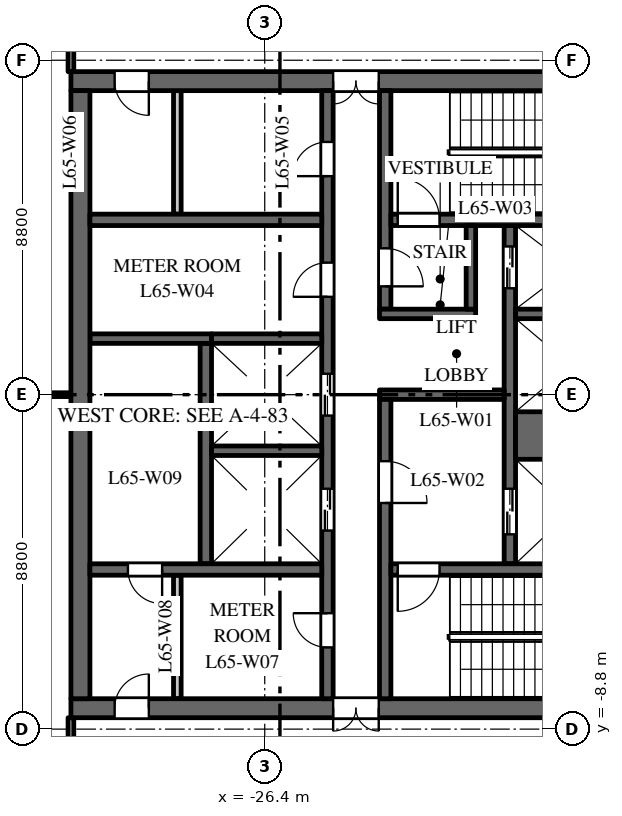
"""IFC4 building model, lengths in metres.
Left out: names, types, materials, properties, quantities, classifications, styles, units other than length and angle.
Written with IfcOpenShell. Run it as: python <this file> out.ifc"""

import sys

from ifc_helpers import new_model, si_unit, direction, frame, frame_2d, origin, place, context, subcontext, project, spatial, rectangle, extrude, element, fill, save


model = new_model("IFC4")
c1 = context("Model", 3, precision=1e-05, world=origin(), true_north=direction((0.0, 1.0)))
c2 = subcontext(c1, "Body", "Model", "MODEL_VIEW")
j1 = project(units=[si_unit("LENGTHUNIT", "METRE"), si_unit("PLANEANGLEUNIT", "RADIAN")], contexts=[c1])
p1 = place(None, origin())
s1 = spatial("IfcSite", under=j1, at=p1, CompositionType="ELEMENT")
p2 = place(p1, origin())
s2 = spatial("IfcBuilding", under=s1, at=p2, CompositionType="ELEMENT")
p3 = place(p2, frame((0.0, 0.0, 303.0)))
s3 = spatial("IfcBuildingStorey", under=s2, at=p3, CompositionType="ELEMENT", Elevation=303.0)
p4 = place(p3, frame((-16.5, 8.25, 0.0), z_axis=(0.0, 0.0, 1.0), x_axis=(-1.0, 0.0, 0.0)))
e1 = element("IfcWall", 1, at=p4, inside=s3, PredefinedType="SHEAR", context=c2, shape_type="SweptSolid", body=[
    extrude(rectangle(XDim=15.0, YDim=0.5, at=frame_2d((7.5, 0.0))), origin(), (0.0, 0.0, 1.0), 3.7),
])
p5 = place(p4, frame((6.9, 0.0, 0.0)))
e2 = element("IfcOpeningElement", 2, at=p5, cuts=e1, PredefinedType="OPENING", context=c2, shape_type="SweptSolid", body=[
    extrude(rectangle(XDim=1.2, YDim=2.1, at=frame_2d((0.6, 1.05))), frame((0.0, 0.26, 0.0), z_axis=(0.0, -1.0, 0.0), x_axis=(1.0, 0.0, 0.0)), (0.0, 0.0, 1.0), 0.52),
])
p6 = place(p4, frame((12.95, 0.0, 0.0)))
e3 = element("IfcOpeningElement", 3, at=p6, cuts=e1, PredefinedType="OPENING", context=c2, shape_type="SweptSolid", body=[
    extrude(rectangle(XDim=0.9, YDim=2.1, at=frame_2d((0.45, 1.05))), frame((0.0, 0.26, 0.0), z_axis=(0.0, -1.0, 0.0), x_axis=(1.0, 0.0, 0.0)), (0.0, 0.0, 1.0), 0.52),
])
p7 = place(p3, frame((-16.5, -8.25, 0.0), z_axis=(0.0, 0.0, 1.0), x_axis=(-1.0, 0.0, 0.0)))
e4 = element("IfcWall", 4, at=p7, inside=s3, PredefinedType="SHEAR", context=c2, shape_type="SweptSolid", body=[
    extrude(rectangle(XDim=15.0, YDim=0.5, at=frame_2d((7.5, 0.0))), origin(), (0.0, 0.0, 1.0), 3.7),
])
p8 = place(p7, frame((6.9, 0.0, 0.0)))
e5 = element("IfcOpeningElement", 5, at=p8, cuts=e4, PredefinedType="OPENING", context=c2, shape_type="SweptSolid", body=[
    extrude(rectangle(XDim=1.2, YDim=2.1, at=frame_2d((0.6, 1.05))), frame((0.0, 0.26, 0.0), z_axis=(0.0, -1.0, 0.0), x_axis=(1.0, 0.0, 0.0)), (0.0, 0.0, 1.0), 0.52),
])
p9 = place(p7, frame((12.95, 0.0, 0.0)))
e6 = element("IfcOpeningElement", 6, at=p9, cuts=e4, PredefinedType="OPENING", context=c2, shape_type="SweptSolid", body=[
    extrude(rectangle(XDim=0.9, YDim=2.1, at=frame_2d((0.45, 1.05))), frame((0.0, 0.26, 0.0), z_axis=(0.0, -1.0, 0.0), x_axis=(1.0, 0.0, 0.0)), (0.0, 0.0, 1.0), 0.52),
])
p10 = place(p3, frame((-27.95, -4.45, 0.0), z_axis=(0.0, 0.0, 1.0), x_axis=(0.0, 1.0, 0.0)))
e7 = element("IfcWall", 7, at=p10, inside=s3, PredefinedType="SHEAR", context=c2, shape_type="SweptSolid", body=[
    extrude(rectangle(XDim=5.8, YDim=0.3, at=frame_2d((2.9, 0.0))), origin(), (0.0, 0.0, 1.0), 3.7),
])
p11 = place(p3, frame((-27.8, 1.475, 0.0), z_axis=(0.0, 0.0, 1.0), x_axis=(-1.0, 0.0, 0.0)))
e8 = element("IfcWall", 8, at=p11, inside=s3, PredefinedType="SHEAR", context=c2, shape_type="SweptSolid", body=[
    extrude(rectangle(XDim=3.2, YDim=0.25, at=frame_2d((1.6, 0.0))), origin(), (0.0, 0.0, 1.0), 3.7),
])
p12 = place(p3, frame((-19.95, -4.45, 0.0), z_axis=(0.0, 0.0, 1.0), x_axis=(0.0, 1.0, 0.0)))
e9 = element("IfcWall", 9, at=p12, inside=s3, PredefinedType="SHEAR", context=c2, shape_type="SweptSolid", body=[
    extrude(rectangle(XDim=8.9, YDim=0.3, at=frame_2d((4.45, 0.0))), origin(), (0.0, 0.0, 1.0), 3.7),
])
p13 = place(p12, frame((0.775, 0.0, 0.0)))
e10 = element("IfcOpeningElement", 10, at=p13, cuts=e9, PredefinedType="OPENING", context=c2, shape_type="SweptSolid", body=[
    extrude(rectangle(XDim=1.2, YDim=2.1, at=frame_2d((0.6, 1.05))), frame((0.0, 0.16, 0.0), z_axis=(0.0, -1.0, 0.0), x_axis=(1.0, 0.0, 0.0)), (0.0, 0.0, 1.0), 0.32),
])
p14 = place(p12, frame((7.25, 0.0, 0.0)))
e11 = element("IfcOpeningElement", 11, at=p14, cuts=e9, PredefinedType="OPENING", context=c2, shape_type="SweptSolid", body=[
    extrude(rectangle(XDim=1.1, YDim=2.1, at=frame_2d((0.55, 1.05))), frame((0.0, 0.16, 0.0), z_axis=(0.0, -1.0, 0.0), x_axis=(1.0, 0.0, 0.0)), (0.0, 0.0, 1.0), 0.32),
])
p15 = place(p3, frame((-24.75, -8.0, 0.0), z_axis=(0.0, 0.0, 1.0), x_axis=(0.0, 1.0, 0.0)))
e12 = element("IfcWall", 12, at=p15, inside=s3, PredefinedType="SHEAR", context=c2, shape_type="SweptSolid", body=[
    extrude(rectangle(XDim=16.0, YDim=0.3, at=frame_2d((8.0, 0.0))), origin(), (0.0, 0.0, 1.0), 3.7),
])
p16 = place(p15, frame((4.425, 0.0, 0.0)))
e13 = element("IfcOpeningElement", 13, at=p16, cuts=e12, PredefinedType="OPENING", context=c2, shape_type="SweptSolid", body=[
    extrude(rectangle(XDim=1.1, YDim=2.1, at=frame_2d((0.55, 1.05))), frame((0.0, 0.16, 0.0), z_axis=(0.0, -1.0, 0.0), x_axis=(1.0, 0.0, 0.0)), (0.0, 0.0, 1.0), 0.32),
])
p17 = place(p15, frame((7.45, 0.0, 0.0)))
e14 = element("IfcOpeningElement", 14, at=p17, cuts=e12, PredefinedType="OPENING", context=c2, shape_type="SweptSolid", body=[
    extrude(rectangle(XDim=1.1, YDim=2.1, at=frame_2d((0.55, 1.05))), frame((0.0, 0.16, 0.0), z_axis=(0.0, -1.0, 0.0), x_axis=(1.0, 0.0, 0.0)), (0.0, 0.0, 1.0), 0.32),
])
p18 = place(p15, frame((10.575, 0.0, 0.0)))
e15 = element("IfcOpeningElement", 15, at=p18, cuts=e12, PredefinedType="OPENING", context=c2, shape_type="SweptSolid", body=[
    extrude(rectangle(XDim=0.9, YDim=2.1, at=frame_2d((0.45, 1.05))), frame((0.0, 0.16, 0.0), z_axis=(0.0, -1.0, 0.0), x_axis=(1.0, 0.0, 0.0)), (0.0, 0.0, 1.0), 0.32),
])
p19 = place(p15, frame((13.75, 0.0, 0.0)))
e16 = element("IfcOpeningElement", 16, at=p19, cuts=e12, PredefinedType="OPENING", context=c2, shape_type="SweptSolid", body=[
    extrude(rectangle(XDim=0.9, YDim=2.1, at=frame_2d((0.45, 1.05))), frame((0.0, 0.16, 0.0), z_axis=(0.0, -1.0, 0.0), x_axis=(1.0, 0.0, 0.0)), (0.0, 0.0, 1.0), 0.32),
])
p20 = place(p15, frame((1.35, 0.0, 0.0)))
e17 = element("IfcOpeningElement", 17, at=p20, cuts=e12, PredefinedType="OPENING", context=c2, shape_type="SweptSolid", body=[
    extrude(rectangle(XDim=0.9, YDim=2.1, at=frame_2d((0.45, 1.05))), frame((0.0, 0.16, 0.0), z_axis=(0.0, -1.0, 0.0), x_axis=(1.0, 0.0, 0.0)), (0.0, 0.0, 1.0), 0.32),
])
p21 = place(p3, frame((-20.1, 0.0, 0.0), z_axis=(0.0, 0.0, 1.0), x_axis=(-1.0, 0.0, 0.0)))
e18 = element("IfcWall", 18, at=p21, inside=s3, PredefinedType="SHEAR", context=c2, shape_type="SweptSolid", body=[
    extrude(rectangle(XDim=3.28, YDim=0.25, at=frame_2d((1.64, 0.0))), origin(), (0.0, 0.0, 1.0), 3.7),
])
p22 = place(p3, frame((-31.25, -8.0, 0.0), z_axis=(0.0, 0.0, 1.0), x_axis=(0.0, 1.0, 0.0)))
e19 = element("IfcWall", 19, at=p22, inside=s3, PredefinedType="SHEAR", context=c2, shape_type="SweptSolid", body=[
    extrude(rectangle(XDim=16.0, YDim=0.5, at=frame_2d((8.0, 0.0))), origin(), (0.0, 0.0, 1.0), 3.7),
])
p23 = place(p3, frame((-24.9, 4.6, 0.0), z_axis=(0.0, 0.0, 1.0), x_axis=(-1.0, 0.0, 0.0)))
e20 = element("IfcWall", 20, at=p23, inside=s3, PredefinedType="SHEAR", context=c2, shape_type="SweptSolid", body=[
    extrude(rectangle(XDim=6.1, YDim=0.3, at=frame_2d((3.05, 0.0))), origin(), (0.0, 0.0, 1.0), 3.7),
])
for number, where, z_axis, x_axis in (
    (21, (-28.7, 4.75, 0.0), (0.0, 0.0, 1.0), (0.0, 1.0, 0.0)),
    (22, (-28.7, -8.0, 0.0), (0.0, 0.0, 1.0), (0.0, 1.0, 0.0)),
):
    element("IfcWall", number, at=place(p3, frame(where, z_axis=z_axis, x_axis=x_axis)), inside=s3, PredefinedType="PARTITIONING", context=c2, shape_type="SweptSolid", body=[
        extrude(rectangle(XDim=3.25, YDim=0.2, at=frame_2d((1.625, 0.0))), origin(), (0.0, 0.0, 1.0), 3.7),
    ])
p24 = place(p3, frame((-24.9, -4.6, 0.0), z_axis=(0.0, 0.0, 1.0), x_axis=(-1.0, 0.0, 0.0)))
e23 = element("IfcWall", 23, at=p24, inside=s3, PredefinedType="SHEAR", context=c2, shape_type="SweptSolid", body=[
    extrude(rectangle(XDim=6.1, YDim=0.3, at=frame_2d((3.05, 0.0))), origin(), (0.0, 0.0, 1.0), 3.7),
])
p25 = place(p24, frame((4.2, 0.0, 0.0)))
e24 = element("IfcOpeningElement", 24, at=p25, cuts=e23, PredefinedType="OPENING", context=c2, shape_type="SweptSolid", body=[
    extrude(rectangle(XDim=0.9, YDim=2.1, at=frame_2d((0.45, 1.05))), frame((0.0, 0.16, 0.0), z_axis=(0.0, -1.0, 0.0), x_axis=(1.0, 0.0, 0.0)), (0.0, 0.0, 1.0), 0.32),
])
p26 = place(p3, frame((-16.9, -1.075, 0.0), z_axis=(0.0, 0.0, 1.0), x_axis=(-1.0, 0.0, 0.0)))
e25 = element("IfcWall", 25, at=p26, inside=s3, PredefinedType="SHEAR", context=c2, shape_type="SweptSolid", body=[
    extrude(rectangle(XDim=2.9, YDim=1.25, at=frame_2d((1.45, 0.0))), origin(), (0.0, 0.0, 1.0), 3.7),
])
for number, where, z_axis, x_axis in (
    (26, (-16.9, 2.125, 0.0), (0.0, 0.0, 1.0), (-1.0, 0.0, 0.0)),
    (27, (-24.9, -1.475, 0.0), (0.0, 0.0, 1.0), (-1.0, 0.0, 0.0)),
    (28, (-24.9, 1.475, 0.0), (0.0, 0.0, 1.0), (-1.0, 0.0, 0.0)),
):
    element("IfcWall", number, at=place(p3, frame(where, z_axis=z_axis, x_axis=x_axis)), inside=s3, PredefinedType="SHEAR", context=c2, shape_type="SweptSolid", body=[
        extrude(rectangle(XDim=2.9, YDim=0.25, at=frame_2d((1.45, 0.0))), origin(), (0.0, 0.0, 1.0), 3.7),
    ])
p27 = place(p3, frame((-23.23, 2.25, 0.0), z_axis=(0.0, 0.0, 1.0), x_axis=(0.0, 1.0, 0.0)))
e29 = element("IfcWall", 29, at=p27, inside=s3, PredefinedType="SHEAR", context=c2, shape_type="SweptSolid", body=[
    extrude(rectangle(XDim=5.75, YDim=0.3, at=frame_2d((2.875, 0.0))), origin(), (0.0, 0.0, 1.0), 3.7),
])
p28 = place(p27, frame((0.6, 0.0, 0.0)))
e30 = element("IfcOpeningElement", 30, at=p28, cuts=e29, PredefinedType="OPENING", context=c2, shape_type="SweptSolid", body=[
    extrude(rectangle(XDim=1.0, YDim=2.1, at=frame_2d((0.5, 1.05))), frame((0.0, 0.16, 0.0), z_axis=(0.0, -1.0, 0.0), x_axis=(1.0, 0.0, 0.0)), (0.0, 0.0, 1.0), 0.32),
])
p29 = place(p3, frame((-23.23, -8.0, 0.0), z_axis=(0.0, 0.0, 1.0), x_axis=(0.0, 1.0, 0.0)))
e31 = element("IfcWall", 31, at=p29, inside=s3, PredefinedType="SHEAR", context=c2, shape_type="SweptSolid", body=[
    extrude(rectangle(XDim=7.875, YDim=0.3, at=frame_2d((3.938, 0.0))), origin(), (0.0, 0.0, 1.0), 3.7),
])
p30 = place(p29, frame((5.15, 0.0, 0.0)))
e32 = element("IfcOpeningElement", 32, at=p30, cuts=e31, PredefinedType="OPENING", context=c2, shape_type="SweptSolid", body=[
    extrude(rectangle(XDim=1.1, YDim=2.1, at=frame_2d((0.55, 1.05))), frame((0.0, 0.16, 0.0), z_axis=(0.0, -1.0, 0.0), x_axis=(1.0, 0.0, 0.0)), (0.0, 0.0, 1.0), 0.32),
])
p31 = place(p3, frame((-16.9, 4.6, 0.0), z_axis=(0.0, 0.0, 1.0), x_axis=(-1.0, 0.0, 0.0)))
e33 = element("IfcWall", 33, at=p31, inside=s3, PredefinedType="SHEAR", context=c2, shape_type="SweptSolid", body=[
    extrude(rectangle(XDim=6.18, YDim=0.3, at=frame_2d((3.09, 0.0))), origin(), (0.0, 0.0, 1.0), 3.7),
])
p32 = place(p31, frame((4.9, 0.0, 0.0)))
e34 = element("IfcOpeningElement", 34, at=p32, cuts=e33, PredefinedType="OPENING", context=c2, shape_type="SweptSolid", body=[
    extrude(rectangle(XDim=1.1, YDim=2.1, at=frame_2d((0.55, 1.05))), frame((0.0, 0.16, 0.0), z_axis=(0.0, -1.0, 0.0), x_axis=(1.0, 0.0, 0.0)), (0.0, 0.0, 1.0), 0.32),
])
p33 = place(p3, frame((-16.9, -4.6, 0.0), z_axis=(0.0, 0.0, 1.0), x_axis=(-1.0, 0.0, 0.0)))
e35 = element("IfcWall", 35, at=p33, inside=s3, PredefinedType="SHEAR", context=c2, shape_type="SweptSolid", body=[
    extrude(rectangle(XDim=6.18, YDim=0.3, at=frame_2d((3.09, 0.0))), origin(), (0.0, 0.0, 1.0), 3.7),
])
p34 = place(p33, frame((4.9, 0.0, 0.0)))
e36 = element("IfcOpeningElement", 36, at=p34, cuts=e35, PredefinedType="OPENING", context=c2, shape_type="SweptSolid", body=[
    extrude(rectangle(XDim=1.1, YDim=2.1, at=frame_2d((0.55, 1.05))), frame((0.0, 0.16, 0.0), z_axis=(0.0, -1.0, 0.0), x_axis=(1.0, 0.0, 0.0)), (0.0, 0.0, 1.0), 0.32),
])
p35 = place(p3, frame((-20.85, 2.125, 0.0), z_axis=(0.0, 0.0, 1.0), x_axis=(-1.0, 0.0, 0.0)))
e37 = element("IfcWall", 37, at=p35, inside=s3, PredefinedType="SHEAR", context=c2, shape_type="SweptSolid", body=[
    extrude(rectangle(XDim=2.53, YDim=0.25, at=frame_2d((1.265, 0.0))), origin(), (0.0, 0.0, 1.0), 3.7),
])
p36 = place(p3, frame((-20.975, 2.25, 0.0), z_axis=(0.0, 0.0, 1.0), x_axis=(0.0, 1.0, 0.0)))
e38 = element("IfcWall", 38, at=p36, inside=s3, PredefinedType="SHEAR", context=c2, shape_type="SweptSolid", body=[
    extrude(rectangle(XDim=2.2, YDim=0.25, at=frame_2d((1.1, 0.0))), origin(), (0.0, 0.0, 1.0), 3.7),
])
p37 = place(p3, frame((-35.949, 0.0, 0.0), z_axis=(0.0, 0.0, 1.0), x_axis=(1.0, 0.0, 0.0)))
e39 = element("IfcWall", 39, at=p37, inside=s3, PredefinedType="PARTITIONING", context=c2, shape_type="SweptSolid", body=[
    extrude(rectangle(XDim=4.449, YDim=0.1, at=frame_2d((2.225, 0.0))), origin(), (0.0, 0.0, 1.0), 3.0),
])
for number, where, z_axis, x_axis in (
    (40, (-31.5, -11.5, 0.0), (0.0, 0.0, 1.0), (0.0, 1.0, 0.0)),
    (41, (-31.5, 8.5, 0.0), (0.0, 0.0, 1.0), (0.0, 1.0, 0.0)),
):
    element("IfcWall", number, at=place(p3, frame(where, z_axis=z_axis, x_axis=x_axis)), inside=s3, PredefinedType="PARTITIONING", context=c2, shape_type="SweptSolid", body=[
        extrude(rectangle(XDim=3.0, YDim=0.15, at=frame_2d((1.5, 0.0))), origin(), (0.0, 0.0, 1.0), 3.0),
    ])
p38 = place(p13, origin())
e42 = element("IfcDoor", 42, at=p38, inside=s3, OperationType="DOUBLE_DOOR_SLIDING", PredefinedType="DOOR", context=c2, shape_type="SweptSolid", body=[
    extrude(rectangle(XDim=1.2, YDim=2.1, at=frame_2d((0.6, 1.05))), frame((0.0, 0.025, 0.0), z_axis=(0.0, -1.0, 0.0), x_axis=(1.0, 0.0, 0.0)), (0.0, 0.0, 1.0), 0.05),
])
fill(e10, e42)
p39 = place(p14, origin())
e43 = element("IfcDoor", 43, at=p39, inside=s3, OperationType="DOUBLE_DOOR_SLIDING", PredefinedType="DOOR", context=c2, shape_type="SweptSolid", body=[
    extrude(rectangle(XDim=1.1, YDim=2.1, at=frame_2d((0.55, 1.05))), frame((0.0, 0.025, 0.0), z_axis=(0.0, -1.0, 0.0), x_axis=(1.0, 0.0, 0.0)), (0.0, 0.0, 1.0), 0.05),
])
fill(e11, e43)
p40 = place(p16, origin())
e44 = element("IfcDoor", 44, at=p40, inside=s3, OperationType="DOUBLE_DOOR_SLIDING", PredefinedType="DOOR", context=c2, shape_type="SweptSolid", body=[
    extrude(rectangle(XDim=1.1, YDim=2.1, at=frame_2d((0.55, 1.05))), frame((0.0, 0.025, 0.0), z_axis=(0.0, -1.0, 0.0), x_axis=(1.0, 0.0, 0.0)), (0.0, 0.0, 1.0), 0.05),
])
fill(e13, e44)
p41 = place(p17, origin())
e45 = element("IfcDoor", 45, at=p41, inside=s3, OperationType="DOUBLE_DOOR_SLIDING", PredefinedType="DOOR", context=c2, shape_type="SweptSolid", body=[
    extrude(rectangle(XDim=1.1, YDim=2.1, at=frame_2d((0.55, 1.05))), frame((0.0, 0.025, 0.0), z_axis=(0.0, -1.0, 0.0), x_axis=(1.0, 0.0, 0.0)), (0.0, 0.0, 1.0), 0.05),
])
fill(e14, e45)
p42 = place(p32, origin())
e46 = element("IfcDoor", 46, at=p42, inside=s3, OperationType="SINGLE_SWING_RIGHT", PredefinedType="DOOR", context=c2, shape_type="SweptSolid", body=[
    extrude(rectangle(XDim=1.1, YDim=2.1, at=frame_2d((0.55, 1.05))), frame((0.0, 0.025, 0.0), z_axis=(0.0, -1.0, 0.0), x_axis=(1.0, 0.0, 0.0)), (0.0, 0.0, 1.0), 0.05),
])
fill(e34, e46)
p43 = place(p34, origin())
e47 = element("IfcDoor", 47, at=p43, inside=s3, OperationType="SINGLE_SWING_LEFT", PredefinedType="DOOR", context=c2, shape_type="SweptSolid", body=[
    extrude(rectangle(XDim=1.1, YDim=2.1, at=frame_2d((0.55, 1.05))), frame((0.0, 0.025, 0.0), z_axis=(0.0, -1.0, 0.0), x_axis=(1.0, 0.0, 0.0)), (0.0, 0.0, 1.0), 0.05),
])
fill(e36, e47)
p44 = place(p30, origin())
e48 = element("IfcDoor", 48, at=p44, inside=s3, OperationType="SINGLE_SWING_LEFT", PredefinedType="DOOR", context=c2, shape_type="SweptSolid", body=[
    extrude(rectangle(XDim=1.1, YDim=2.1, at=frame_2d((0.55, 1.05))), frame((0.0, 0.025, 0.0), z_axis=(0.0, -1.0, 0.0), x_axis=(1.0, 0.0, 0.0)), (0.0, 0.0, 1.0), 0.05),
])
fill(e32, e48)
p45 = place(p28, origin())
e49 = element("IfcDoor", 49, at=p45, inside=s3, OperationType="SINGLE_SWING_LEFT", PredefinedType="DOOR", context=c2, shape_type="SweptSolid", body=[
    extrude(rectangle(XDim=1.0, YDim=2.1, at=frame_2d((0.5, 1.05))), frame((0.0, 0.025, 0.0), z_axis=(0.0, -1.0, 0.0), x_axis=(1.0, 0.0, 0.0)), (0.0, 0.0, 1.0), 0.05),
])
fill(e30, e49)
p46 = place(p5, origin())
e50 = element("IfcDoor", 50, at=p46, inside=s3, OperationType="DOUBLE_DOOR_DOUBLE_SWING", PredefinedType="DOOR", context=c2, shape_type="SweptSolid", body=[
    extrude(rectangle(XDim=1.2, YDim=2.1, at=frame_2d((0.6, 1.05))), frame((0.0, 0.025, 0.0), z_axis=(0.0, -1.0, 0.0), x_axis=(1.0, 0.0, 0.0)), (0.0, 0.0, 1.0), 0.05),
])
fill(e2, e50)
p47 = place(p8, origin())
e51 = element("IfcDoor", 51, at=p47, inside=s3, OperationType="DOUBLE_DOOR_DOUBLE_SWING", PredefinedType="DOOR", context=c2, shape_type="SweptSolid", body=[
    extrude(rectangle(XDim=1.2, YDim=2.1, at=frame_2d((0.6, 1.05))), frame((0.0, 0.025, 0.0), z_axis=(0.0, -1.0, 0.0), x_axis=(1.0, 0.0, 0.0)), (0.0, 0.0, 1.0), 0.05),
])
fill(e5, e51)
p48 = place(p18, origin())
e52 = element("IfcDoor", 52, at=p48, inside=s3, OperationType="SINGLE_SWING_RIGHT", PredefinedType="DOOR", context=c2, shape_type="SweptSolid", body=[
    extrude(rectangle(XDim=0.9, YDim=2.1, at=frame_2d((0.45, 1.05))), frame((0.0, 0.025, 0.0), z_axis=(0.0, -1.0, 0.0), x_axis=(1.0, 0.0, 0.0)), (0.0, 0.0, 1.0), 0.05),
])
fill(e15, e52)
p49 = place(p19, origin())
e53 = element("IfcDoor", 53, at=p49, inside=s3, OperationType="SINGLE_SWING_RIGHT", PredefinedType="DOOR", context=c2, shape_type="SweptSolid", body=[
    extrude(rectangle(XDim=0.9, YDim=2.1, at=frame_2d((0.45, 1.05))), frame((0.0, 0.025, 0.0), z_axis=(0.0, -1.0, 0.0), x_axis=(1.0, 0.0, 0.0)), (0.0, 0.0, 1.0), 0.05),
])
fill(e16, e53)
p50 = place(p6, origin())
e54 = element("IfcDoor", 54, at=p50, inside=s3, OperationType="SINGLE_SWING_RIGHT", PredefinedType="DOOR", context=c2, shape_type="SweptSolid", body=[
    extrude(rectangle(XDim=0.9, YDim=2.1, at=frame_2d((0.45, 1.05))), frame((0.0, 0.025, 0.0), z_axis=(0.0, -1.0, 0.0), x_axis=(1.0, 0.0, 0.0)), (0.0, 0.0, 1.0), 0.05),
])
fill(e3, e54)
p51 = place(p20, origin())
e55 = element("IfcDoor", 55, at=p51, inside=s3, OperationType="SINGLE_SWING_LEFT", PredefinedType="DOOR", context=c2, shape_type="SweptSolid", body=[
    extrude(rectangle(XDim=0.9, YDim=2.1, at=frame_2d((0.45, 1.05))), frame((0.0, 0.025, 0.0), z_axis=(0.0, -1.0, 0.0), x_axis=(1.0, 0.0, 0.0)), (0.0, 0.0, 1.0), 0.05),
])
fill(e17, e55)
p52 = place(p9, origin())
e56 = element("IfcDoor", 56, at=p52, inside=s3, OperationType="SINGLE_SWING_LEFT", PredefinedType="DOOR", context=c2, shape_type="SweptSolid", body=[
    extrude(rectangle(XDim=0.9, YDim=2.1, at=frame_2d((0.45, 1.05))), frame((0.0, 0.025, 0.0), z_axis=(0.0, -1.0, 0.0), x_axis=(1.0, 0.0, 0.0)), (0.0, 0.0, 1.0), 0.05),
])
fill(e6, e56)
p53 = place(p25, origin())
e57 = element("IfcDoor", 57, at=p53, inside=s3, OperationType="SINGLE_SWING_RIGHT", PredefinedType="DOOR", context=c2, shape_type="SweptSolid", body=[
    extrude(rectangle(XDim=0.9, YDim=2.1, at=frame_2d((0.45, 1.05))), frame((0.0, 0.025, 0.0), z_axis=(0.0, -1.0, 0.0), x_axis=(1.0, 0.0, 0.0)), (0.0, 0.0, 1.0), 0.05),
])
fill(e24, e57)
save(model, sys.argv[1])
